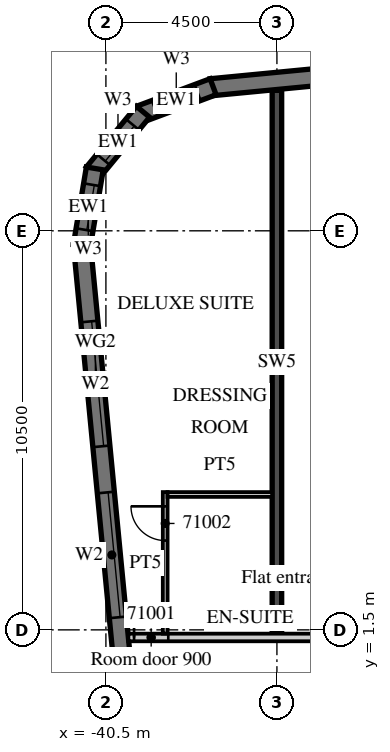
"""IFC4 building model, lengths in metres.
Left out: names, types, materials, properties, quantities, classifications, styles, units other than length and angle.
Written with IfcOpenShell. Run it as: python <this file> out.ifc"""

import sys

from ifc_helpers import new_model, si_unit, direction, frame, frame_2d, origin, place, context, subcontext, project, spatial, polyline, rectangle, outline, extrude, element, fill, save


model = new_model("IFC4")
c1 = context("Model", 3, precision=1e-05, world=origin(), true_north=direction((0.0, 1.0)))
c2 = subcontext(c1, "Body", "Model", "MODEL_VIEW")
j1 = project(units=[si_unit("LENGTHUNIT", "METRE"), si_unit("PLANEANGLEUNIT", "RADIAN")], contexts=[c1])
p1 = place(None, origin())
s1 = spatial("IfcSite", under=j1, at=p1, CompositionType="ELEMENT")
p2 = place(p1, origin())
s2 = spatial("IfcBuilding", under=s1, at=p2, CompositionType="ELEMENT")
p3 = place(p2, frame((0.0, 0.0, 285.0)))
s3 = spatial("IfcBuildingStorey", under=s2, at=p3, CompositionType="ELEMENT", Elevation=285.0)
p4 = place(p3, frame((-36.0, 1.4, 0.0), z_axis=(0.0, 0.0, 1.0), x_axis=(0.0, 1.0, 0.0)))
e1 = element("IfcWall", 1, at=p4, inside=s3, PredefinedType="SHEAR", context=c2, shape_type="SweptSolid", body=[
    extrude(rectangle(XDim=14.296, YDim=0.25, at=frame_2d((7.148, 0.0))), origin(), (0.0, 0.0, 1.0), 3.3),
])
p5 = place(p3, frame((-41.132, 11.658, 0.0), z_axis=(0.0, 0.0, 1.0), x_axis=(0.095847749461, -0.995396006082, 0.0)))
e2 = element("IfcWall", 2, at=p5, inside=s3, PredefinedType="SOLIDWALL", context=c2, shape_type="SweptSolid", body=[
    extrude(rectangle(XDim=32.0, YDim=0.45, at=frame_2d((16.0, 0.0))), origin(), (0.0, 0.0, 1.0), 3.02),
])
p6 = place(p5, frame((2.053, 0.0, 0.45)))
e3 = element("IfcOpeningElement", 3, at=p6, cuts=e2, PredefinedType="OPENING", context=c2, shape_type="SweptSolid", body=[
    extrude(rectangle(XDim=3.3, YDim=2.25, at=frame_2d((1.65, 1.125))), frame((0.0, 0.235, 0.0), z_axis=(0.0, -1.0, 0.0), x_axis=(1.0, 0.0, 0.0)), (0.0, 0.0, 1.0), 0.47),
])
p7 = place(p5, frame((6.574, 0.0, 0.45)))
e4 = element("IfcOpeningElement", 4, at=p7, cuts=e2, PredefinedType="OPENING", context=c2, shape_type="SweptSolid", body=[
    extrude(rectangle(XDim=3.3, YDim=2.25, at=frame_2d((1.65, 1.125))), frame((0.0, 0.235, 0.0), z_axis=(0.0, -1.0, 0.0), x_axis=(1.0, 0.0, 0.0)), (0.0, 0.0, 1.0), 0.47),
])
p8 = place(p3, frame((13.521, 20.713, 0.0), z_axis=(0.0, 0.0, 1.0), x_axis=(-0.995396277313, -0.095844932638, 0.0)))
e5 = element("IfcWall", 5, at=p8, inside=s3, PredefinedType="SOLIDWALL", context=c2, shape_type="SweptSolid", body=[
    extrude(rectangle(XDim=51.495, YDim=0.45, at=frame_2d((25.748, 0.0))), origin(), (0.0, 0.0, 1.0), 3.02),
])
p9 = place(p8, frame((0.91, 0.0, 0.45)))
e6 = element("IfcOpeningElement", 6, at=p9, cuts=e5, PredefinedType="OPENING", context=c2, shape_type="SweptSolid", body=[
    extrude(rectangle(XDim=2.7, YDim=2.25, at=frame_2d((1.35, 1.125))), frame((0.0, 0.235, 0.0), z_axis=(0.0, -1.0, 0.0), x_axis=(1.0, 0.0, 0.0)), (0.0, 0.0, 1.0), 0.47),
])
p10 = place(p8, frame((5.431, 0.0, 0.45)))
e7 = element("IfcOpeningElement", 7, at=p10, cuts=e5, PredefinedType="OPENING", context=c2, shape_type="SweptSolid", body=[
    extrude(rectangle(XDim=2.7, YDim=2.25, at=frame_2d((1.35, 1.125))), frame((0.0, 0.235, 0.0), z_axis=(0.0, -1.0, 0.0), x_axis=(1.0, 0.0, 0.0)), (0.0, 0.0, 1.0), 0.47),
])
p11 = place(p8, frame((9.952, 0.0, 0.45)))
e8 = element("IfcOpeningElement", 8, at=p11, cuts=e5, PredefinedType="OPENING", context=c2, shape_type="SweptSolid", body=[
    extrude(rectangle(XDim=2.7, YDim=2.25, at=frame_2d((1.35, 1.125))), frame((0.0, 0.235, 0.0), z_axis=(0.0, -1.0, 0.0), x_axis=(1.0, 0.0, 0.0)), (0.0, 0.0, 1.0), 0.47),
])
p12 = place(p8, frame((14.473, 0.0, 0.45)))
e9 = element("IfcOpeningElement", 9, at=p12, cuts=e5, PredefinedType="OPENING", context=c2, shape_type="SweptSolid", body=[
    extrude(rectangle(XDim=2.7, YDim=2.25, at=frame_2d((1.35, 1.125))), frame((0.0, 0.235, 0.0), z_axis=(0.0, -1.0, 0.0), x_axis=(1.0, 0.0, 0.0)), (0.0, 0.0, 1.0), 0.47),
])
p13 = place(p8, frame((18.994, 0.0, 0.45)))
e10 = element("IfcOpeningElement", 10, at=p13, cuts=e5, PredefinedType="OPENING", context=c2, shape_type="SweptSolid", body=[
    extrude(rectangle(XDim=2.7, YDim=2.25, at=frame_2d((1.35, 1.125))), frame((0.0, 0.235, 0.0), z_axis=(0.0, -1.0, 0.0), x_axis=(1.0, 0.0, 0.0)), (0.0, 0.0, 1.0), 0.47),
])
p14 = place(p8, frame((23.514, 0.0, 0.45)))
e11 = element("IfcOpeningElement", 11, at=p14, cuts=e5, PredefinedType="OPENING", context=c2, shape_type="SweptSolid", body=[
    extrude(rectangle(XDim=2.7, YDim=2.25, at=frame_2d((1.35, 1.125))), frame((0.0, 0.235, 0.0), z_axis=(0.0, -1.0, 0.0), x_axis=(1.0, 0.0, 0.0)), (0.0, 0.0, 1.0), 0.47),
])
p15 = place(p8, frame((28.035, 0.0, 0.45)))
e12 = element("IfcOpeningElement", 12, at=p15, cuts=e5, PredefinedType="OPENING", context=c2, shape_type="SweptSolid", body=[
    extrude(rectangle(XDim=2.7, YDim=2.25, at=frame_2d((1.35, 1.125))), frame((0.0, 0.235, 0.0), z_axis=(0.0, -1.0, 0.0), x_axis=(1.0, 0.0, 0.0)), (0.0, 0.0, 1.0), 0.47),
])
p16 = place(p8, frame((32.556, 0.0, 0.45)))
e13 = element("IfcOpeningElement", 13, at=p16, cuts=e5, PredefinedType="OPENING", context=c2, shape_type="SweptSolid", body=[
    extrude(rectangle(XDim=2.7, YDim=2.25, at=frame_2d((1.35, 1.125))), frame((0.0, 0.235, 0.0), z_axis=(0.0, -1.0, 0.0), x_axis=(1.0, 0.0, 0.0)), (0.0, 0.0, 1.0), 0.47),
])
p17 = place(p8, frame((37.077, 0.0, 0.45)))
e14 = element("IfcOpeningElement", 14, at=p17, cuts=e5, PredefinedType="OPENING", context=c2, shape_type="SweptSolid", body=[
    extrude(rectangle(XDim=2.7, YDim=2.25, at=frame_2d((1.35, 1.125))), frame((0.0, 0.235, 0.0), z_axis=(0.0, -1.0, 0.0), x_axis=(1.0, 0.0, 0.0)), (0.0, 0.0, 1.0), 0.47),
])
p18 = place(p8, frame((41.598, 0.0, 0.45)))
e15 = element("IfcOpeningElement", 15, at=p18, cuts=e5, PredefinedType="OPENING", context=c2, shape_type="SweptSolid", body=[
    extrude(rectangle(XDim=2.7, YDim=2.25, at=frame_2d((1.35, 1.125))), frame((0.0, 0.235, 0.0), z_axis=(0.0, -1.0, 0.0), x_axis=(1.0, 0.0, 0.0)), (0.0, 0.0, 1.0), 0.47),
])
p19 = place(p8, frame((46.118, 0.0, 0.45)))
e16 = element("IfcOpeningElement", 16, at=p19, cuts=e5, PredefinedType="OPENING", context=c2, shape_type="SweptSolid", body=[
    extrude(rectangle(XDim=2.7, YDim=2.25, at=frame_2d((1.35, 1.125))), frame((0.0, 0.235, 0.0), z_axis=(0.0, -1.0, 0.0), x_axis=(1.0, 0.0, 0.0)), (0.0, 0.0, 1.0), 0.47),
])
p20 = place(p3, frame((-37.679, 15.791, 0.0), z_axis=(0.0, 0.0, 1.0), x_axis=(-0.936677599948, -0.350192909346, 0.0)))
e17 = element("IfcWall", 17, at=p20, inside=s3, PredefinedType="SOLIDWALL", context=c2, shape_type="SweptSolid", body=[
    extrude(outline(polyline([(0.0, -0.225), (2.071, -0.225), (1.95, 0.225), (0.121, 0.225), (0.0, -0.225)])), origin(), (0.0, 0.0, 1.0), 3.02),
])
p21 = place(p20, frame((0.435, 0.0, 0.45)))
e18 = element("IfcOpeningElement", 18, at=p21, cuts=e17, PredefinedType="OPENING", context=c2, shape_type="SweptSolid", body=[
    extrude(rectangle(XDim=1.2, YDim=2.25, at=frame_2d((0.6, 1.125))), frame((0.0, 0.235, 0.0), z_axis=(0.0, -1.0, 0.0), x_axis=(1.0, 0.0, 0.0)), (0.0, 0.0, 1.0), 0.47),
])
p22 = place(p3, frame((-39.524, 15.133, 0.0), z_axis=(0.0, 0.0, 1.0), x_axis=(-0.636046112757, -0.771651049663, 0.0)))
e19 = element("IfcWall", 19, at=p22, inside=s3, PredefinedType="SOLIDWALL", context=c2, shape_type="SweptSolid", body=[
    extrude(outline(polyline([(0.0, -0.225), (2.071, -0.225), (1.95, 0.225), (0.121, 0.225), (0.0, -0.225)])), origin(), (0.0, 0.0, 1.0), 3.02),
])
p23 = place(p22, frame((0.435, 0.0, 0.45)))
e20 = element("IfcOpeningElement", 20, at=p23, cuts=e19, PredefinedType="OPENING", context=c2, shape_type="SweptSolid", body=[
    extrude(rectangle(XDim=1.2, YDim=2.25, at=frame_2d((0.6, 1.125))), frame((0.0, 0.235, 0.0), z_axis=(0.0, -1.0, 0.0), x_axis=(1.0, 0.0, 0.0)), (0.0, 0.0, 1.0), 0.47),
])
p24 = place(p3, frame((-40.792, 13.641, 0.0), z_axis=(0.0, 0.0, 1.0), x_axis=(-0.165068144653, -0.986282164302, 0.0)))
e21 = element("IfcWall", 21, at=p24, inside=s3, PredefinedType="SOLIDWALL", context=c2, shape_type="SweptSolid", body=[
    extrude(outline(polyline([(0.0, -0.225), (2.071, -0.225), (1.95, 0.225), (0.121, 0.225), (0.0, -0.225)])), origin(), (0.0, 0.0, 1.0), 3.02),
])
p25 = place(p24, frame((0.435, 0.0, 0.45)))
e22 = element("IfcOpeningElement", 22, at=p25, cuts=e21, PredefinedType="OPENING", context=c2, shape_type="SweptSolid", body=[
    extrude(rectangle(XDim=1.2, YDim=2.25, at=frame_2d((0.6, 1.125))), frame((0.0, 0.235, 0.0), z_axis=(0.0, -1.0, 0.0), x_axis=(1.0, 0.0, 0.0)), (0.0, 0.0, 1.0), 0.47),
])
p26 = place(p3, frame((-39.909, 1.3, 0.0), z_axis=(0.0, 0.0, 1.0), x_axis=(1.0, 0.0, 0.0)))
e23 = element("IfcWall", 23, at=p26, inside=s3, PredefinedType="PARTITIONING", context=c2, shape_type="SweptSolid", body=[
    extrude(rectangle(XDim=53.409, YDim=0.2, at=frame_2d((26.705, 0.0))), origin(), (0.0, 0.0, 1.0), 3.02),
])
p27 = place(p26, frame((0.15, 0.0, 0.0)))
e24 = element("IfcOpeningElement", 24, at=p27, cuts=e23, PredefinedType="OPENING", context=c2, shape_type="SweptSolid", body=[
    extrude(rectangle(XDim=0.9, YDim=2.1, at=frame_2d((0.45, 1.05))), frame((0.0, 0.11, 0.0), z_axis=(0.0, -1.0, 0.0), x_axis=(1.0, 0.0, 0.0)), (0.0, 0.0, 1.0), 0.22),
])
p28 = place(p26, frame((6.347, 0.0, 0.0)))
e25 = element("IfcOpeningElement", 25, at=p28, cuts=e23, PredefinedType="OPENING", context=c2, shape_type="SweptSolid", body=[
    extrude(rectangle(XDim=1.2, YDim=2.1, at=frame_2d((0.6, 1.05))), frame((0.0, 0.11, 0.0), z_axis=(0.0, -1.0, 0.0), x_axis=(1.0, 0.0, 0.0)), (0.0, 0.0, 1.0), 0.22),
])
p29 = place(p26, frame((15.347, 0.0, 0.0)))
e26 = element("IfcOpeningElement", 26, at=p29, cuts=e23, PredefinedType="OPENING", context=c2, shape_type="SweptSolid", body=[
    extrude(rectangle(XDim=1.2, YDim=2.1, at=frame_2d((0.6, 1.05))), frame((0.0, 0.11, 0.0), z_axis=(0.0, -1.0, 0.0), x_axis=(1.0, 0.0, 0.0)), (0.0, 0.0, 1.0), 0.22),
])
p30 = place(p26, frame((24.346, 0.0, 0.0)))
e27 = element("IfcOpeningElement", 27, at=p30, cuts=e23, PredefinedType="OPENING", context=c2, shape_type="SweptSolid", body=[
    extrude(rectangle(XDim=1.2, YDim=2.1, at=frame_2d((0.6, 1.05))), frame((0.0, 0.11, 0.0), z_axis=(0.0, -1.0, 0.0), x_axis=(1.0, 0.0, 0.0)), (0.0, 0.0, 1.0), 0.22),
])
p31 = place(p26, frame((33.346, 0.0, 0.0)))
e28 = element("IfcOpeningElement", 28, at=p31, cuts=e23, PredefinedType="OPENING", context=c2, shape_type="SweptSolid", body=[
    extrude(rectangle(XDim=1.2, YDim=2.1, at=frame_2d((0.6, 1.05))), frame((0.0, 0.11, 0.0), z_axis=(0.0, -1.0, 0.0), x_axis=(1.0, 0.0, 0.0)), (0.0, 0.0, 1.0), 0.22),
])
p32 = place(p26, frame((42.346, 0.0, 0.0)))
e29 = element("IfcOpeningElement", 29, at=p32, cuts=e23, PredefinedType="OPENING", context=c2, shape_type="SweptSolid", body=[
    extrude(rectangle(XDim=1.2, YDim=2.1, at=frame_2d((0.6, 1.05))), frame((0.0, 0.11, 0.0), z_axis=(0.0, -1.0, 0.0), x_axis=(1.0, 0.0, 0.0)), (0.0, 0.0, 1.0), 0.22),
])
p33 = place(p26, frame((51.834, 0.0, 0.0)))
e30 = element("IfcOpeningElement", 30, at=p33, cuts=e23, PredefinedType="OPENING", context=c2, shape_type="SweptSolid", body=[
    extrude(rectangle(XDim=1.0, YDim=2.1, at=frame_2d((0.5, 1.05))), frame((0.0, 0.11, 0.0), z_axis=(0.0, -1.0, 0.0), x_axis=(1.0, 0.0, 0.0)), (0.0, 0.0, 1.0), 0.22),
])
p34 = place(p3, frame((-38.94, 1.4, 0.0), z_axis=(0.0, 0.0, 1.0), x_axis=(0.0, 1.0, 0.0)))
e31 = element("IfcWall", 31, at=p34, inside=s3, PredefinedType="PARTITIONING", context=c2, shape_type="SweptSolid", body=[
    extrude(rectangle(XDim=3.725, YDim=0.125, at=frame_2d((1.863, 0.0))), origin(), (0.0, 0.0, 1.0), 3.02),
])
p35 = place(p34, frame((2.45, 0.0, 0.0)))
e32 = element("IfcOpeningElement", 32, at=p35, cuts=e31, PredefinedType="OPENING", context=c2, shape_type="SweptSolid", body=[
    extrude(rectangle(XDim=0.9, YDim=2.1, at=frame_2d((0.45, 1.05))), frame((0.0, 0.073, 0.0), z_axis=(0.0, -1.0, 0.0), x_axis=(1.0, 0.0, 0.0)), (0.0, 0.0, 1.0), 0.145),
])
p36 = place(p3, frame((-38.878, 5.062, 0.0), z_axis=(0.0, 0.0, 1.0), x_axis=(1.0, 0.0, 0.0)))
e33 = element("IfcWall", 33, at=p36, inside=s3, PredefinedType="PARTITIONING", context=c2, shape_type="SweptSolid", body=[
    extrude(rectangle(XDim=2.753, YDim=0.125, at=frame_2d((1.376, 0.0))), origin(), (0.0, 0.0, 1.0), 3.02),
])
p37 = place(p6, origin())
e34 = element("IfcWindow", 34, at=p37, inside=s3, PartitioningType="SINGLE_PANEL", PredefinedType="WINDOW", context=c2, shape_type="SweptSolid", body=[
    extrude(rectangle(XDim=3.3, YDim=2.25, at=frame_2d((1.65, 1.125))), frame((0.0, 0.09, 0.0), z_axis=(0.0, -1.0, 0.0), x_axis=(1.0, 0.0, 0.0)), (0.0, 0.0, 1.0), 0.06),
])
fill(e3, e34)
p38 = place(p7, origin())
e35 = element("IfcWindow", 35, at=p38, inside=s3, PartitioningType="SINGLE_PANEL", PredefinedType="WINDOW", context=c2, shape_type="SweptSolid", body=[
    extrude(rectangle(XDim=3.3, YDim=2.25, at=frame_2d((1.65, 1.125))), frame((0.0, 0.09, 0.0), z_axis=(0.0, -1.0, 0.0), x_axis=(1.0, 0.0, 0.0)), (0.0, 0.0, 1.0), 0.06),
])
fill(e4, e35)
p39 = place(p21, origin())
e36 = element("IfcWindow", 36, at=p39, inside=s3, PartitioningType="SINGLE_PANEL", PredefinedType="WINDOW", context=c2, shape_type="SweptSolid", body=[
    extrude(rectangle(XDim=1.2, YDim=2.25, at=frame_2d((0.6, 1.125))), frame((0.0, 0.09, 0.0), z_axis=(0.0, -1.0, 0.0), x_axis=(1.0, 0.0, 0.0)), (0.0, 0.0, 1.0), 0.06),
])
fill(e18, e36)
p40 = place(p23, origin())
e37 = element("IfcWindow", 37, at=p40, inside=s3, PartitioningType="SINGLE_PANEL", PredefinedType="WINDOW", context=c2, shape_type="SweptSolid", body=[
    extrude(rectangle(XDim=1.2, YDim=2.25, at=frame_2d((0.6, 1.125))), frame((0.0, 0.09, 0.0), z_axis=(0.0, -1.0, 0.0), x_axis=(1.0, 0.0, 0.0)), (0.0, 0.0, 1.0), 0.06),
])
fill(e20, e37)
p41 = place(p25, origin())
e38 = element("IfcWindow", 38, at=p41, inside=s3, PartitioningType="SINGLE_PANEL", PredefinedType="WINDOW", context=c2, shape_type="SweptSolid", body=[
    extrude(rectangle(XDim=1.2, YDim=2.25, at=frame_2d((0.6, 1.125))), frame((0.0, 0.09, 0.0), z_axis=(0.0, -1.0, 0.0), x_axis=(1.0, 0.0, 0.0)), (0.0, 0.0, 1.0), 0.06),
])
fill(e22, e38)
p42 = place(p27, origin())
e39 = element("IfcDoor", 39, at=p42, inside=s3, OperationType="SINGLE_SWING_LEFT", PredefinedType="DOOR", context=c2, shape_type="SweptSolid", body=[
    extrude(rectangle(XDim=0.9, YDim=2.1, at=frame_2d((0.45, 1.05))), frame((0.0, 0.025, 0.0), z_axis=(0.0, -1.0, 0.0), x_axis=(1.0, 0.0, 0.0)), (0.0, 0.0, 1.0), 0.05),
])
fill(e24, e39)
p43 = place(p35, origin())
e40 = element("IfcDoor", 40, at=p43, inside=s3, OperationType="SINGLE_SWING_RIGHT", PredefinedType="DOOR", context=c2, shape_type="SweptSolid", body=[
    extrude(rectangle(XDim=0.9, YDim=2.1, at=frame_2d((0.45, 1.05))), frame((0.0, 0.025, 0.0), z_axis=(0.0, -1.0, 0.0), x_axis=(1.0, 0.0, 0.0)), (0.0, 0.0, 1.0), 0.05),
])
fill(e32, e40)
save(model, sys.argv[1])
